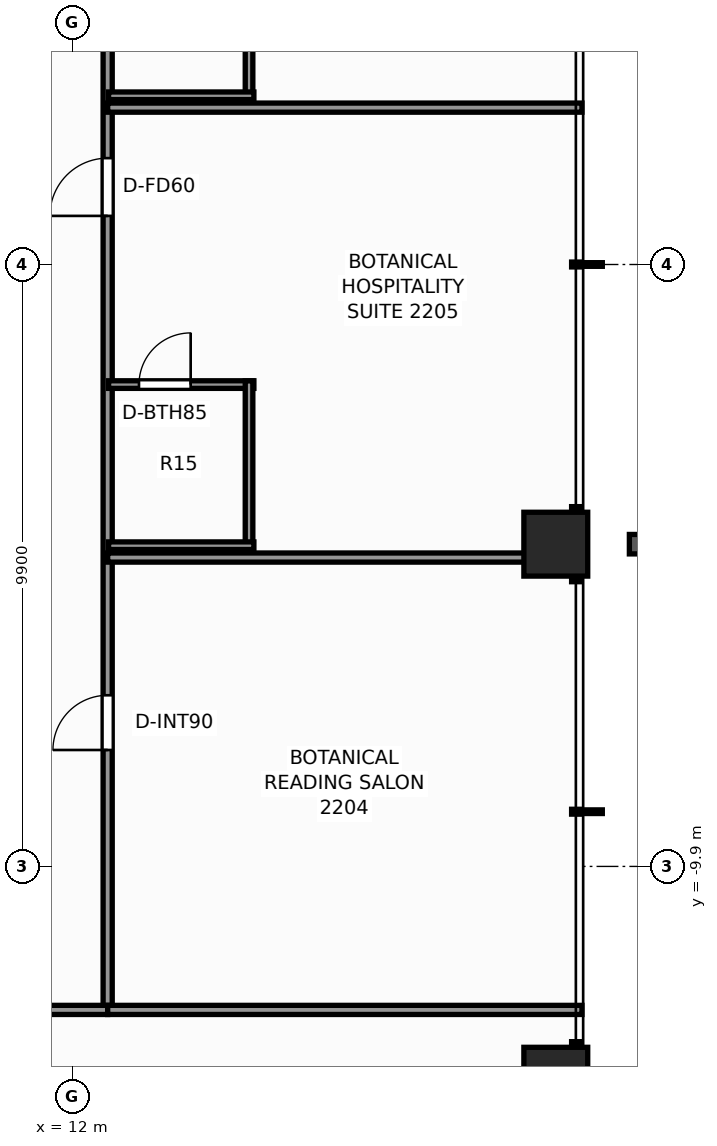
"""IFC4 building model, lengths in metres.
Left out: names, types, materials, properties, quantities, classifications, styles, units other than length and angle.
Written with IfcOpenShell. Run it as: python <this file> out.ifc"""

import sys

from ifc_helpers import new_model, si_unit, direction, frame, frame_2d, origin, origin_2d, place, context, subcontext, project, spatial, rectangle, extrude, element, fill, save


model = new_model("IFC4")
c1 = context("Model", 3, precision=1e-05, world=origin(), true_north=direction((0.0, 1.0)))
c2 = subcontext(c1, "Body", "Model", "MODEL_VIEW")
j1 = project(units=[si_unit("LENGTHUNIT", "METRE"), si_unit("PLANEANGLEUNIT", "RADIAN")], contexts=[c1])
p1 = place(None, origin())
s1 = spatial("IfcSite", under=j1, at=p1, CompositionType="ELEMENT")
p2 = place(p1, origin())
s2 = spatial("IfcBuilding", under=s1, at=p2, CompositionType="ELEMENT")
p3 = place(p2, frame((0.0, 0.0, 78.8)))
s3 = spatial("IfcBuildingStorey", under=s2, at=p3, CompositionType="ELEMENT", Elevation=78.8)
for number, where, z_axis, x_axis in (
    (1, (19.95, -13.4, 0.0), (0.0, 0.0, 1.0), (1.0, 0.0, 0.0)),
    (2, (19.95, -4.6, 0.0), (0.0, 0.0, 1.0), (1.0, 0.0, 0.0)),
):
    element("IfcColumn", number, at=place(p3, frame(where, z_axis=z_axis, x_axis=x_axis)), inside=s3, PredefinedType="COLUMN", context=c2, shape_type="SweptSolid", body=[
        extrude(rectangle(XDim=1.05, YDim=1.05, at=origin_2d()), origin(), (0.0, 0.0, 1.0), 3.3),
    ])
p4 = place(p3, frame((12.58, -12.26, 0.0), z_axis=(0.0, 0.0, 1.0), x_axis=(0.0, 1.0, 0.0)))
e3 = element("IfcWall", 3, at=p4, inside=s3, PredefinedType="PARTITIONING", context=c2, shape_type="SweptSolid", body=[
    extrude(rectangle(XDim=24.84, YDim=0.15, at=frame_2d((12.42, 0.0))), origin(), (0.0, 0.0, 1.0), 2.292),
])
p5 = place(p4, frame((4.275, 0.0, 0.0)))
e4 = element("IfcOpeningElement", 4, at=p5, cuts=e3, PredefinedType="OPENING", context=c2, shape_type="SweptSolid", body=[
    extrude(rectangle(XDim=0.9, YDim=2.06, at=frame_2d((0.45, 1.03))), frame((0.0, 0.085, 0.0), z_axis=(0.0, -1.0, 0.0), x_axis=(1.0, 0.0, 0.0)), (0.0, 0.0, 1.0), 0.17),
])
p6 = place(p4, frame((13.059, 0.0, 0.0)))
e5 = element("IfcOpeningElement", 5, at=p6, cuts=e3, PredefinedType="OPENING", context=c2, shape_type="SweptSolid", body=[
    extrude(rectangle(XDim=0.95, YDim=2.06, at=frame_2d((0.475, 1.03))), frame((0.0, 0.085, 0.0), z_axis=(0.0, -1.0, 0.0), x_axis=(1.0, 0.0, 0.0)), (0.0, 0.0, 1.0), 0.17),
])
p7 = place(p4, frame((19.508, 0.0, 0.0)))
e6 = element("IfcOpeningElement", 6, at=p7, cuts=e3, PredefinedType="OPENING", context=c2, shape_type="SweptSolid", body=[
    extrude(rectangle(XDim=0.95, YDim=2.06, at=frame_2d((0.475, 1.03))), frame((0.0, 0.085, 0.0), z_axis=(0.0, -1.0, 0.0), x_axis=(1.0, 0.0, 0.0)), (0.0, 0.0, 1.0), 0.17),
])
p8 = place(p3, frame((-3.65, -12.26, 0.0), z_axis=(0.0, 0.0, 1.0), x_axis=(1.0, 0.0, 0.0)))
e7 = element("IfcWall", 7, at=p8, inside=s3, PredefinedType="PARTITIONING", context=c2, shape_type="SweptSolid", body=[
    extrude(rectangle(XDim=16.23, YDim=0.15, at=frame_2d((8.115, 0.0))), origin(), (0.0, 0.0, 1.0), 2.292),
])
p9 = place(p8, frame((1.397, 0.0, 0.0)))
e8 = element("IfcOpeningElement", 8, at=p9, cuts=e7, PredefinedType="OPENING", context=c2, shape_type="SweptSolid", body=[
    extrude(rectangle(XDim=0.95, YDim=2.06, at=frame_2d((0.475, 1.03))), frame((0.0, 0.085, 0.0), z_axis=(0.0, -1.0, 0.0), x_axis=(1.0, 0.0, 0.0)), (0.0, 0.0, 1.0), 0.17),
])
p10 = place(p8, frame((10.735, 0.0, 0.0)))
e9 = element("IfcOpeningElement", 9, at=p10, cuts=e7, PredefinedType="OPENING", context=c2, shape_type="SweptSolid", body=[
    extrude(rectangle(XDim=0.9, YDim=2.06, at=frame_2d((0.45, 1.03))), frame((0.0, 0.085, 0.0), z_axis=(0.0, -1.0, 0.0), x_axis=(1.0, 0.0, 0.0)), (0.0, 0.0, 1.0), 0.17),
])
for number, where, z_axis, x_axis in (
    (10, (12.58, -12.26, 0.0), (0.0, 0.0, 1.0), (1.0, 0.0, 0.0)),
    (11, (12.58, -4.82, 0.0), (0.0, 0.0, 1.0), (1.0, 0.0, 0.0)),
):
    element("IfcWall", number, at=place(p3, frame(where, z_axis=z_axis, x_axis=x_axis)), inside=s3, PredefinedType="PARTITIONING", context=c2, shape_type="SweptSolid", body=[
        extrude(rectangle(XDim=7.8, YDim=0.15, at=frame_2d((3.9, 0.0))), origin(), (0.0, 0.0, 1.0), 2.292),
    ])
p11 = place(p3, frame((12.58, 2.58, 0.0), z_axis=(0.0, 0.0, 1.0), x_axis=(1.0, 0.0, 0.0)))
e12 = element("IfcWall", 12, at=p11, inside=s3, PredefinedType="PARTITIONING", context=c2, shape_type="SweptSolid", body=[
    extrude(rectangle(XDim=7.8, YDim=0.15, at=frame_2d((3.9, 0.0))), origin(), (0.0, 0.0, 1.0), 2.449),
])
p12 = place(p3, frame((12.595, -1.975, 0.0), z_axis=(0.0, 0.0, 1.0), x_axis=(1.0, 0.0, 0.0)))
e13 = element("IfcWall", 13, at=p12, inside=s3, PredefinedType="PARTITIONING", context=c2, shape_type="SweptSolid", body=[
    extrude(rectangle(XDim=2.39, YDim=0.125, at=frame_2d((1.195, 0.0))), origin(), (0.0, 0.0, 1.0), 2.369),
])
p13 = place(p12, frame((0.5, 0.0, 0.0)))
e14 = element("IfcOpeningElement", 14, at=p13, cuts=e13, PredefinedType="OPENING", context=c2, shape_type="SweptSolid", body=[
    extrude(rectangle(XDim=0.85, YDim=2.03, at=frame_2d((0.425, 1.015))), frame((0.0, 0.073, 0.0), z_axis=(0.0, -1.0, 0.0), x_axis=(1.0, 0.0, 0.0)), (0.0, 0.0, 1.0), 0.145),
])
p14 = place(p3, frame((14.905, -4.685, 0.0), z_axis=(0.0, 0.0, 1.0), x_axis=(0.0, 1.0, 0.0)))
e15 = element("IfcWall", 15, at=p14, inside=s3, PredefinedType="PARTITIONING", context=c2, shape_type="SweptSolid", body=[
    extrude(rectangle(XDim=2.77, YDim=0.125, at=frame_2d((1.385, 0.0))), origin(), (0.0, 0.0, 1.0), 2.292),
])
p15 = place(p3, frame((12.595, -4.625, 0.0), z_axis=(0.0, 0.0, 1.0), x_axis=(1.0, 0.0, 0.0)))
e16 = element("IfcWall", 16, at=p15, inside=s3, PredefinedType="PARTITIONING", context=c2, shape_type="SweptSolid", body=[
    extrude(rectangle(XDim=2.39, YDim=0.125, at=frame_2d((1.195, 0.0))), origin(), (0.0, 0.0, 1.0), 2.292),
])
p16 = place(p3, frame((14.905, 2.715, 0.0), z_axis=(0.0, 0.0, 1.0), x_axis=(0.0, 1.0, 0.0)))
e17 = element("IfcWall", 17, at=p16, inside=s3, PredefinedType="PARTITIONING", context=c2, shape_type="SweptSolid", body=[
    extrude(rectangle(XDim=2.77, YDim=0.125, at=frame_2d((1.385, 0.0))), origin(), (0.0, 0.0, 1.0), 2.292),
])
p17 = place(p3, frame((12.595, 2.775, 0.0), z_axis=(0.0, 0.0, 1.0), x_axis=(1.0, 0.0, 0.0)))
e18 = element("IfcWall", 18, at=p17, inside=s3, PredefinedType="PARTITIONING", context=c2, shape_type="SweptSolid", body=[
    extrude(rectangle(XDim=2.39, YDim=0.125, at=frame_2d((1.195, 0.0))), origin(), (0.0, 0.0, 1.0), 3.08),
])
p18 = place(p5, origin())
e19 = element("IfcDoor", 19, at=p18, inside=s3, OperationType="SINGLE_SWING_LEFT", PredefinedType="DOOR", context=c2, shape_type="SweptSolid", body=[
    extrude(rectangle(XDim=0.9, YDim=2.06, at=frame_2d((0.45, 1.03))), frame((0.0, 0.025, 0.0), z_axis=(0.0, -1.0, 0.0), x_axis=(1.0, 0.0, 0.0)), (0.0, 0.0, 1.0), 0.05),
])
fill(e4, e19)
p19 = place(p13, origin())
e20 = element("IfcDoor", 20, at=p19, inside=s3, OperationType="SINGLE_SWING_RIGHT", PredefinedType="DOOR", context=c2, shape_type="SweptSolid", body=[
    extrude(rectangle(XDim=0.85, YDim=2.03, at=frame_2d((0.425, 1.015))), frame((0.0, 0.025, 0.0), z_axis=(0.0, -1.0, 0.0), x_axis=(1.0, 0.0, 0.0)), (0.0, 0.0, 1.0), 0.05),
])
fill(e14, e20)
p20 = place(p6, origin())
e21 = element("IfcDoor", 21, at=p20, inside=s3, OperationType="SINGLE_SWING_LEFT", PredefinedType="DOOR", context=c2, shape_type="SweptSolid", body=[
    extrude(rectangle(XDim=0.95, YDim=2.06, at=frame_2d((0.475, 1.03))), frame((0.0, 0.025, 0.0), z_axis=(0.0, -1.0, 0.0), x_axis=(1.0, 0.0, 0.0)), (0.0, 0.0, 1.0), 0.05),
])
fill(e5, e21)
save(model, sys.argv[1])
